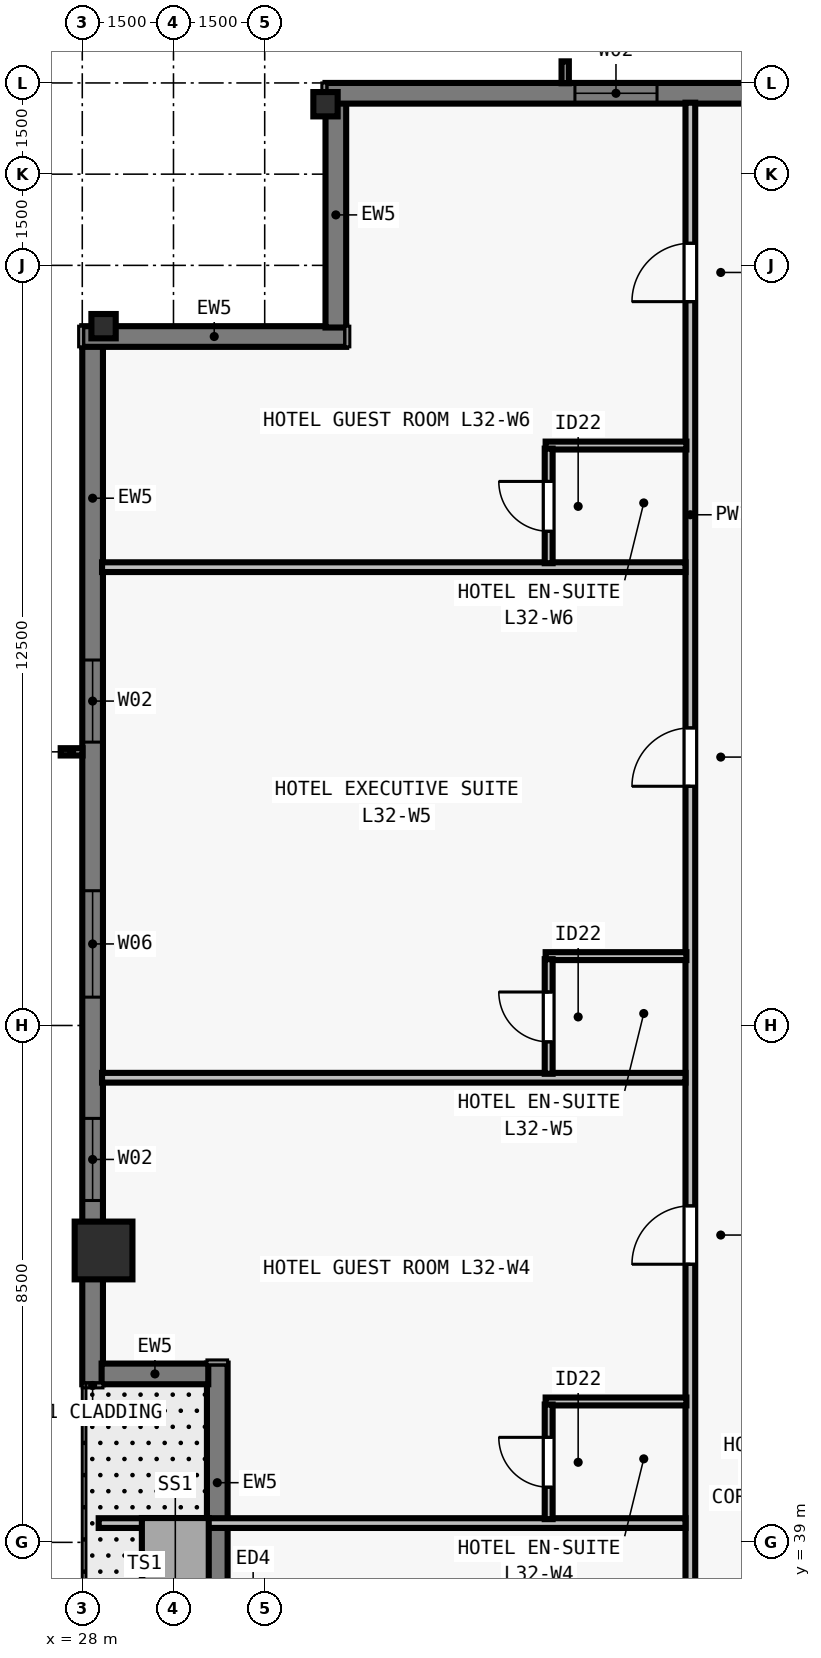
"""IFC4 building model, lengths in metres.
Left out: names, types, materials, properties, quantities, classifications, styles, units other than length and angle.
Written with IfcOpenShell. Run it as: python <this file> out.ifc"""

import sys

from ifc_helpers import new_model, si_unit, direction, frame, frame_2d, origin, origin_2d, place, context, subcontext, project, spatial, rectangle, i_section, extrude, element, fill, save


model = new_model("IFC4")
c1 = context("Model", 3, precision=1e-05, world=origin(), true_north=direction((0.0, 1.0)))
c2 = subcontext(c1, "Body", "Model", "MODEL_VIEW")
j1 = project(units=[si_unit("LENGTHUNIT", "METRE"), si_unit("PLANEANGLEUNIT", "RADIAN")], contexts=[c1])
p1 = place(None, origin())
s1 = spatial("IfcSite", under=j1, at=p1, CompositionType="ELEMENT")
p2 = place(p1, origin())
s2 = spatial("IfcBuilding", under=s1, at=p2, CompositionType="ELEMENT")
p3 = place(p2, frame((0.0, 0.0, 120.0)))
s3 = spatial("IfcBuildingStorey", under=s2, at=p3, CompositionType="ELEMENT", Elevation=120.0)
for number, where, z_axis, x_axis in (
    (1, (32.0, 62.65, 0.0), (0.0, 0.0, 1.0), (1.0, 0.0, 0.0)),
    (2, (28.35, 59.0, 0.0), (0.0, 0.0, 1.0), (0.0, 1.0, 0.0)),
):
    element("IfcColumn", number, at=place(p3, frame(where, z_axis=z_axis, x_axis=x_axis)), inside=s3, PredefinedType="COLUMN", context=c2, shape_type="SweptSolid", body=[
        extrude(i_section(OverallWidth=0.4, OverallDepth=0.4, WebThickness=0.022, FlangeThickness=0.036, at=origin_2d()), origin(), (0.0, 0.0, 1.0), 3.5),
    ])
p4 = place(p3, frame((28.35, 43.8, 0.0), z_axis=(0.0, 0.0, 1.0), x_axis=(0.0, 1.0, 0.0)))
e3 = element("IfcColumn", 3, at=p4, inside=s3, PredefinedType="COLUMN", context=c2, shape_type="SweptSolid", body=[
    extrude(rectangle(XDim=0.95, YDim=0.95, at=origin_2d()), origin(), (0.0, 0.0, 1.0), 3.5),
])
p5 = place(p3, frame((28.17, 41.6, 0.0), z_axis=(0.0, 0.0, 1.0), x_axis=(0.0, 1.0, 0.0)))
e4 = element("IfcWall", 4, at=p5, inside=s3, PredefinedType="SOLIDWALL", context=c2, shape_type="SweptSolid", body=[
    extrude(rectangle(XDim=17.082, YDim=0.34, at=frame_2d((8.541, 0.0))), origin(), (0.0, 0.0, 1.0), 3.28),
])
p6 = place(p5, frame((3.022, 0.0, 0.8)))
e5 = element("IfcOpeningElement", 5, at=p6, cuts=e4, PredefinedType="OPENING", context=c2, shape_type="SweptSolid", body=[
    extrude(rectangle(XDim=1.35, YDim=1.66, at=frame_2d((0.675, 0.83))), frame((0.0, 0.18, 0.0), z_axis=(0.0, -1.0, 0.0), x_axis=(1.0, 0.0, 0.0)), (0.0, 0.0, 1.0), 0.36),
])
p7 = place(p5, frame((6.366, 0.0, 0.8)))
e6 = element("IfcOpeningElement", 6, at=p7, cuts=e4, PredefinedType="OPENING", context=c2, shape_type="SweptSolid", body=[
    extrude(rectangle(XDim=1.75, YDim=1.66, at=frame_2d((0.875, 0.83))), frame((0.0, 0.18, 0.0), z_axis=(0.0, -1.0, 0.0), x_axis=(1.0, 0.0, 0.0)), (0.0, 0.0, 1.0), 0.36),
])
p8 = place(p5, frame((10.56, 0.0, 0.8)))
e7 = element("IfcOpeningElement", 7, at=p8, cuts=e4, PredefinedType="OPENING", context=c2, shape_type="SweptSolid", body=[
    extrude(rectangle(XDim=1.35, YDim=1.66, at=frame_2d((0.675, 0.83))), frame((0.0, 0.18, 0.0), z_axis=(0.0, -1.0, 0.0), x_axis=(1.0, 0.0, 0.0)), (0.0, 0.0, 1.0), 0.36),
])
p9 = place(p3, frame((28.0, 58.83, 0.0), z_axis=(0.0, 0.0, 1.0), x_axis=(1.0, 0.0, 0.0)))
e8 = element("IfcWall", 8, at=p9, inside=s3, PredefinedType="SOLIDWALL", context=c2, shape_type="SweptSolid", body=[
    extrude(rectangle(XDim=4.34, YDim=0.34, at=frame_2d((2.17, 0.0))), origin(), (0.0, 0.0, 1.0), 3.28),
])
p10 = place(p3, frame((32.17, 58.978, 0.0), z_axis=(0.0, 0.0, 1.0), x_axis=(0.0, 1.0, 0.0)))
e9 = element("IfcWall", 9, at=p10, inside=s3, PredefinedType="SOLIDWALL", context=c2, shape_type="SweptSolid", body=[
    extrude(rectangle(XDim=3.704, YDim=0.34, at=frame_2d((1.852, 0.0))), origin(), (0.0, 0.0, 1.0), 3.28),
])
p11 = place(p3, frame((32.0, 62.83, 0.0), z_axis=(0.0, 0.0, 1.0), x_axis=(1.0, 0.0, 0.0)))
e10 = element("IfcWall", 10, at=p11, inside=s3, PredefinedType="SOLIDWALL", context=c2, shape_type="SweptSolid", body=[
    extrude(rectangle(XDim=39.682, YDim=0.34, at=frame_2d((19.841, 0.0))), origin(), (0.0, 0.0, 1.0), 3.28),
])
p12 = place(p11, frame((4.102, 0.0, 0.8)))
e11 = element("IfcOpeningElement", 11, at=p12, cuts=e10, PredefinedType="OPENING", context=c2, shape_type="SweptSolid", body=[
    extrude(rectangle(XDim=1.35, YDim=1.66, at=frame_2d((0.675, 0.83))), frame((0.0, 0.18, 0.0), z_axis=(0.0, -1.0, 0.0), x_axis=(1.0, 0.0, 0.0)), (0.0, 0.0, 1.0), 0.36),
])
p13 = place(p11, frame((8.755, 0.0, 0.8)))
e12 = element("IfcOpeningElement", 12, at=p13, cuts=e10, PredefinedType="OPENING", context=c2, shape_type="SweptSolid", body=[
    extrude(rectangle(XDim=1.75, YDim=1.66, at=frame_2d((0.875, 0.83))), frame((0.0, 0.18, 0.0), z_axis=(0.0, -1.0, 0.0), x_axis=(1.0, 0.0, 0.0)), (0.0, 0.0, 1.0), 0.36),
])
p14 = place(p11, frame((12.059, 0.0, 0.8)))
e13 = element("IfcOpeningElement", 13, at=p14, cuts=e10, PredefinedType="OPENING", context=c2, shape_type="SweptSolid", body=[
    extrude(rectangle(XDim=1.35, YDim=1.66, at=frame_2d((0.675, 0.83))), frame((0.0, 0.18, 0.0), z_axis=(0.0, -1.0, 0.0), x_axis=(1.0, 0.0, 0.0)), (0.0, 0.0, 1.0), 0.36),
])
p15 = place(p11, frame((16.262, 0.0, 0.8)))
e14 = element("IfcOpeningElement", 14, at=p15, cuts=e10, PredefinedType="OPENING", context=c2, shape_type="SweptSolid", body=[
    extrude(rectangle(XDim=1.75, YDim=1.66, at=frame_2d((0.875, 0.83))), frame((0.0, 0.18, 0.0), z_axis=(0.0, -1.0, 0.0), x_axis=(1.0, 0.0, 0.0)), (0.0, 0.0, 1.0), 0.36),
])
p16 = place(p11, frame((18.316, 0.0, 0.8)))
e15 = element("IfcOpeningElement", 15, at=p16, cuts=e10, PredefinedType="OPENING", context=c2, shape_type="SweptSolid", body=[
    extrude(rectangle(XDim=1.35, YDim=1.66, at=frame_2d((0.675, 0.83))), frame((0.0, 0.18, 0.0), z_axis=(0.0, -1.0, 0.0), x_axis=(1.0, 0.0, 0.0)), (0.0, 0.0, 1.0), 0.36),
])
p17 = place(p11, frame((22.07, 0.0, 0.8)))
e16 = element("IfcOpeningElement", 16, at=p17, cuts=e10, PredefinedType="OPENING", context=c2, shape_type="SweptSolid", body=[
    extrude(rectangle(XDim=1.75, YDim=1.66, at=frame_2d((0.875, 0.83))), frame((0.0, 0.18, 0.0), z_axis=(0.0, -1.0, 0.0), x_axis=(1.0, 0.0, 0.0)), (0.0, 0.0, 1.0), 0.36),
])
p18 = place(p11, frame((26.273, 0.0, 0.8)))
e17 = element("IfcOpeningElement", 17, at=p18, cuts=e10, PredefinedType="OPENING", context=c2, shape_type="SweptSolid", body=[
    extrude(rectangle(XDim=1.35, YDim=1.66, at=frame_2d((0.675, 0.83))), frame((0.0, 0.18, 0.0), z_axis=(0.0, -1.0, 0.0), x_axis=(1.0, 0.0, 0.0)), (0.0, 0.0, 1.0), 0.36),
])
p19 = place(p11, frame((33.38, 0.0, 0.8)))
e18 = element("IfcOpeningElement", 18, at=p19, cuts=e10, PredefinedType="OPENING", context=c2, shape_type="SweptSolid", body=[
    extrude(rectangle(XDim=1.35, YDim=1.66, at=frame_2d((0.675, 0.83))), frame((0.0, 0.18, 0.0), z_axis=(0.0, -1.0, 0.0), x_axis=(1.0, 0.0, 0.0)), (0.0, 0.0, 1.0), 0.36),
])
p20 = place(p3, frame((30.22, 34.778, 0.0), z_axis=(0.0, 0.0, 1.0), x_axis=(0.0, 1.0, 0.0)))
e19 = element("IfcWall", 19, at=p20, inside=s3, PredefinedType="SOLIDWALL", context=c2, shape_type="SweptSolid", body=[
    extrude(rectangle(XDim=7.162, YDim=0.34, at=frame_2d((3.581, 0.0))), origin(), (0.0, 0.0, 1.0), 3.28),
])
p21 = place(p20, frame((2.094, 0.0, 0.0)))
e20 = element("IfcOpeningElement", 20, at=p21, cuts=e19, PredefinedType="OPENING", context=c2, shape_type="SweptSolid", body=[
    extrude(rectangle(XDim=1.0, YDim=2.15, at=frame_2d((0.5, 1.075))), frame((0.0, 0.18, 0.0), z_axis=(0.0, -1.0, 0.0), x_axis=(1.0, 0.0, 0.0)), (0.0, 0.0, 1.0), 0.36),
])
p22 = place(p3, frame((30.072, 41.77, 0.0), z_axis=(0.0, 0.0, 1.0), x_axis=(-1.0, 0.0, 0.0)))
e21 = element("IfcWall", 21, at=p22, inside=s3, PredefinedType="SOLIDWALL", context=c2, shape_type="SweptSolid", body=[
    extrude(rectangle(XDim=1.754, YDim=0.34, at=frame_2d((0.877, 0.0))), origin(), (0.0, 0.0, 1.0), 3.28),
])
p23 = place(p3, frame((38.0, 15.325, 0.0), z_axis=(0.0, 0.0, 1.0), x_axis=(0.0, 1.0, 0.0)))
e22 = element("IfcWall", 22, at=p23, inside=s3, PredefinedType="PARTITIONING", context=c2, shape_type="SweptSolid", body=[
    extrude(rectangle(XDim=47.35, YDim=0.16, at=frame_2d((23.675, 0.0))), origin(), (0.0, 0.0, 1.0), 2.555),
])
p24 = place(p23, frame((5.003, 0.0, 0.0)))
e23 = element("IfcOpeningElement", 23, at=p24, cuts=e22, PredefinedType="OPENING", context=c2, shape_type="SweptSolid", body=[
    extrude(rectangle(XDim=0.96, YDim=2.15, at=frame_2d((0.48, 1.075))), frame((0.0, 0.09, 0.0), z_axis=(0.0, -1.0, 0.0), x_axis=(1.0, 0.0, 0.0)), (0.0, 0.0, 1.0), 0.18),
])
p25 = place(p23, frame((12.529, 0.0, 0.0)))
e24 = element("IfcOpeningElement", 24, at=p25, cuts=e22, PredefinedType="OPENING", context=c2, shape_type="SweptSolid", body=[
    extrude(rectangle(XDim=0.96, YDim=2.15, at=frame_2d((0.48, 1.075))), frame((0.0, 0.09, 0.0), z_axis=(0.0, -1.0, 0.0), x_axis=(1.0, 0.0, 0.0)), (0.0, 0.0, 1.0), 0.18),
])
p26 = place(p23, frame((20.389, 0.0, 0.0)))
e25 = element("IfcOpeningElement", 25, at=p26, cuts=e22, PredefinedType="OPENING", context=c2, shape_type="SweptSolid", body=[
    extrude(rectangle(XDim=0.96, YDim=2.15, at=frame_2d((0.48, 1.075))), frame((0.0, 0.09, 0.0), z_axis=(0.0, -1.0, 0.0), x_axis=(1.0, 0.0, 0.0)), (0.0, 0.0, 1.0), 0.18),
])
p27 = place(p23, frame((28.249, 0.0, 0.0)))
e26 = element("IfcOpeningElement", 26, at=p27, cuts=e22, PredefinedType="OPENING", context=c2, shape_type="SweptSolid", body=[
    extrude(rectangle(XDim=0.96, YDim=2.15, at=frame_2d((0.48, 1.075))), frame((0.0, 0.09, 0.0), z_axis=(0.0, -1.0, 0.0), x_axis=(1.0, 0.0, 0.0)), (0.0, 0.0, 1.0), 0.18),
])
p28 = place(p23, frame((36.109, 0.0, 0.0)))
e27 = element("IfcOpeningElement", 27, at=p28, cuts=e22, PredefinedType="OPENING", context=c2, shape_type="SweptSolid", body=[
    extrude(rectangle(XDim=0.96, YDim=2.15, at=frame_2d((0.48, 1.075))), frame((0.0, 0.09, 0.0), z_axis=(0.0, -1.0, 0.0), x_axis=(1.0, 0.0, 0.0)), (0.0, 0.0, 1.0), 0.18),
])
p29 = place(p23, frame((44.079, 0.0, 0.0)))
e28 = element("IfcOpeningElement", 28, at=p29, cuts=e22, PredefinedType="OPENING", context=c2, shape_type="SweptSolid", body=[
    extrude(rectangle(XDim=0.96, YDim=2.15, at=frame_2d((0.48, 1.075))), frame((0.0, 0.09, 0.0), z_axis=(0.0, -1.0, 0.0), x_axis=(1.0, 0.0, 0.0)), (0.0, 0.0, 1.0), 0.18),
])
p30 = place(p3, frame((28.27, 39.317, 0.0), z_axis=(0.0, 0.0, 1.0), x_axis=(1.0, 0.0, 0.0)))
e29 = element("IfcWall", 29, at=p30, inside=s3, PredefinedType="PARTITIONING", context=c2, shape_type="SweptSolid", body=[
    extrude(rectangle(XDim=9.65, YDim=0.16, at=frame_2d((4.825, 0.0))), origin(), (0.0, 0.0, 1.0), 2.896),
])
p31 = place(p3, frame((35.62, 41.317, 0.0), z_axis=(0.0, 0.0, 1.0), x_axis=(1.0, 0.0, 0.0)))
e30 = element("IfcWall", 30, at=p31, inside=s3, PredefinedType="PLUMBINGWALL", context=c2, shape_type="SweptSolid", body=[
    extrude(rectangle(XDim=2.315, YDim=0.13, at=frame_2d((1.157, 0.0))), origin(), (0.0, 0.0, 1.0), 2.896),
])
p32 = place(p3, frame((35.67, 39.382, 0.0), z_axis=(0.0, 0.0, 1.0), x_axis=(0.0, 1.0, 0.0)))
e31 = element("IfcWall", 31, at=p32, inside=s3, PredefinedType="PLUMBINGWALL", context=c2, shape_type="SweptSolid", body=[
    extrude(rectangle(XDim=1.885, YDim=0.13, at=frame_2d((0.942, 0.0))), origin(), (0.0, 0.0, 1.0), 3.28),
])
p33 = place(p32, frame((0.525, 0.0, 0.0)))
e32 = element("IfcOpeningElement", 32, at=p33, cuts=e31, PredefinedType="OPENING", context=c2, shape_type="SweptSolid", body=[
    extrude(rectangle(XDim=0.82, YDim=2.1, at=frame_2d((0.41, 1.05))), frame((0.0, 0.075, 0.0), z_axis=(0.0, -1.0, 0.0), x_axis=(1.0, 0.0, 0.0)), (0.0, 0.0, 1.0), 0.15),
])
p34 = place(p3, frame((28.325, 46.641, 0.0), z_axis=(0.0, 0.0, 1.0), x_axis=(1.0, 0.0, 0.0)))
e33 = element("IfcWall", 33, at=p34, inside=s3, PredefinedType="PARTITIONING", context=c2, shape_type="SweptSolid", body=[
    extrude(rectangle(XDim=9.595, YDim=0.16, at=frame_2d((4.797, 0.0))), origin(), (0.0, 0.0, 1.0), 3.28),
])
p35 = place(p3, frame((35.62, 48.641, 0.0), z_axis=(0.0, 0.0, 1.0), x_axis=(1.0, 0.0, 0.0)))
e34 = element("IfcWall", 34, at=p35, inside=s3, PredefinedType="PLUMBINGWALL", context=c2, shape_type="SweptSolid", body=[
    extrude(rectangle(XDim=2.315, YDim=0.13, at=frame_2d((1.157, 0.0))), origin(), (0.0, 0.0, 1.0), 3.28),
])
p36 = place(p3, frame((35.67, 46.706, 0.0), z_axis=(0.0, 0.0, 1.0), x_axis=(0.0, 1.0, 0.0)))
e35 = element("IfcWall", 35, at=p36, inside=s3, PredefinedType="PLUMBINGWALL", context=c2, shape_type="SweptSolid", body=[
    extrude(rectangle(XDim=1.885, YDim=0.13, at=frame_2d((0.942, 0.0))), origin(), (0.0, 0.0, 1.0), 3.28),
])
p37 = place(p36, frame((0.525, 0.0, 0.0)))
e36 = element("IfcOpeningElement", 36, at=p37, cuts=e35, PredefinedType="OPENING", context=c2, shape_type="SweptSolid", body=[
    extrude(rectangle(XDim=0.82, YDim=2.1, at=frame_2d((0.41, 1.05))), frame((0.0, 0.075, 0.0), z_axis=(0.0, -1.0, 0.0), x_axis=(1.0, 0.0, 0.0)), (0.0, 0.0, 1.0), 0.15),
])
p38 = place(p3, frame((28.325, 55.037, 0.0), z_axis=(0.0, 0.0, 1.0), x_axis=(1.0, 0.0, 0.0)))
e37 = element("IfcWall", 37, at=p38, inside=s3, PredefinedType="PARTITIONING", context=c2, shape_type="SweptSolid", body=[
    extrude(rectangle(XDim=9.595, YDim=0.16, at=frame_2d((4.797, 0.0))), origin(), (0.0, 0.0, 1.0), 2.896),
])
p39 = place(p3, frame((35.62, 57.037, 0.0), z_axis=(0.0, 0.0, 1.0), x_axis=(1.0, 0.0, 0.0)))
e38 = element("IfcWall", 38, at=p39, inside=s3, PredefinedType="PLUMBINGWALL", context=c2, shape_type="SweptSolid", body=[
    extrude(rectangle(XDim=2.315, YDim=0.13, at=frame_2d((1.157, 0.0))), origin(), (0.0, 0.0, 1.0), 3.28),
])
p40 = place(p3, frame((35.67, 55.102, 0.0), z_axis=(0.0, 0.0, 1.0), x_axis=(0.0, 1.0, 0.0)))
e39 = element("IfcWall", 39, at=p40, inside=s3, PredefinedType="PLUMBINGWALL", context=c2, shape_type="SweptSolid", body=[
    extrude(rectangle(XDim=1.885, YDim=0.13, at=frame_2d((0.942, 0.0))), origin(), (0.0, 0.0, 1.0), 3.28),
])
p41 = place(p40, frame((0.525, 0.0, 0.0)))
e40 = element("IfcOpeningElement", 40, at=p41, cuts=e39, PredefinedType="OPENING", context=c2, shape_type="SweptSolid", body=[
    extrude(rectangle(XDim=0.82, YDim=2.1, at=frame_2d((0.41, 1.05))), frame((0.0, 0.075, 0.0), z_axis=(0.0, -1.0, 0.0), x_axis=(1.0, 0.0, 0.0)), (0.0, 0.0, 1.0), 0.15),
])
p42 = place(p6, origin())
e41 = element("IfcWindow", 41, at=p42, inside=s3, PartitioningType="SINGLE_PANEL", PredefinedType="WINDOW", context=c2, shape_type="SweptSolid", body=[
    extrude(rectangle(XDim=1.35, YDim=1.66, at=frame_2d((0.675, 0.83))), frame((0.0, -0.05, 0.0), z_axis=(0.0, -1.0, 0.0), x_axis=(1.0, 0.0, 0.0)), (0.0, 0.0, 1.0), 0.06),
])
fill(e5, e41)
p43 = place(p7, origin())
e42 = element("IfcWindow", 42, at=p43, inside=s3, PartitioningType="SINGLE_PANEL", PredefinedType="WINDOW", context=c2, shape_type="SweptSolid", body=[
    extrude(rectangle(XDim=1.75, YDim=1.66, at=frame_2d((0.875, 0.83))), frame((0.0, -0.05, 0.0), z_axis=(0.0, -1.0, 0.0), x_axis=(1.0, 0.0, 0.0)), (0.0, 0.0, 1.0), 0.06),
])
fill(e6, e42)
p44 = place(p8, origin())
e43 = element("IfcWindow", 43, at=p44, inside=s3, PartitioningType="SINGLE_PANEL", PredefinedType="WINDOW", context=c2, shape_type="SweptSolid", body=[
    extrude(rectangle(XDim=1.35, YDim=1.66, at=frame_2d((0.675, 0.83))), frame((0.0, -0.05, 0.0), z_axis=(0.0, -1.0, 0.0), x_axis=(1.0, 0.0, 0.0)), (0.0, 0.0, 1.0), 0.06),
])
fill(e7, e43)
p45 = place(p12, origin())
e44 = element("IfcWindow", 44, at=p45, inside=s3, PartitioningType="SINGLE_PANEL", PredefinedType="WINDOW", context=c2, shape_type="SweptSolid", body=[
    extrude(rectangle(XDim=1.35, YDim=1.66, at=frame_2d((0.675, 0.83))), frame((0.0, -0.05, 0.0), z_axis=(0.0, -1.0, 0.0), x_axis=(1.0, 0.0, 0.0)), (0.0, 0.0, 1.0), 0.06),
])
fill(e11, e44)
p46 = place(p33, origin())
e45 = element("IfcDoor", 45, at=p46, inside=s3, OperationType="SINGLE_SWING_RIGHT", PredefinedType="DOOR", context=c2, shape_type="SweptSolid", body=[
    extrude(rectangle(XDim=0.82, YDim=2.1, at=frame_2d((0.41, 1.05))), frame((0.0, 0.025, 0.0), z_axis=(0.0, -1.0, 0.0), x_axis=(1.0, 0.0, 0.0)), (0.0, 0.0, 1.0), 0.05),
])
fill(e32, e45)
p47 = place(p27, origin())
e46 = element("IfcDoor", 46, at=p47, inside=s3, OperationType="SINGLE_SWING_LEFT", PredefinedType="DOOR", context=c2, shape_type="SweptSolid", body=[
    extrude(rectangle(XDim=0.96, YDim=2.15, at=frame_2d((0.48, 1.075))), frame((0.0, 0.025, 0.0), z_axis=(0.0, -1.0, 0.0), x_axis=(1.0, 0.0, 0.0)), (0.0, 0.0, 1.0), 0.05),
])
fill(e26, e46)
p48 = place(p37, origin())
e47 = element("IfcDoor", 47, at=p48, inside=s3, OperationType="SINGLE_SWING_RIGHT", PredefinedType="DOOR", context=c2, shape_type="SweptSolid", body=[
    extrude(rectangle(XDim=0.82, YDim=2.1, at=frame_2d((0.41, 1.05))), frame((0.0, 0.025, 0.0), z_axis=(0.0, -1.0, 0.0), x_axis=(1.0, 0.0, 0.0)), (0.0, 0.0, 1.0), 0.05),
])
fill(e36, e47)
p49 = place(p28, origin())
e48 = element("IfcDoor", 48, at=p49, inside=s3, OperationType="SINGLE_SWING_LEFT", PredefinedType="DOOR", context=c2, shape_type="SweptSolid", body=[
    extrude(rectangle(XDim=0.96, YDim=2.15, at=frame_2d((0.48, 1.075))), frame((0.0, 0.025, 0.0), z_axis=(0.0, -1.0, 0.0), x_axis=(1.0, 0.0, 0.0)), (0.0, 0.0, 1.0), 0.05),
])
fill(e27, e48)
p50 = place(p41, origin())
e49 = element("IfcDoor", 49, at=p50, inside=s3, OperationType="SINGLE_SWING_RIGHT", PredefinedType="DOOR", context=c2, shape_type="SweptSolid", body=[
    extrude(rectangle(XDim=0.82, YDim=2.1, at=frame_2d((0.41, 1.05))), frame((0.0, 0.025, 0.0), z_axis=(0.0, -1.0, 0.0), x_axis=(1.0, 0.0, 0.0)), (0.0, 0.0, 1.0), 0.05),
])
fill(e40, e49)
p51 = place(p29, origin())
e50 = element("IfcDoor", 50, at=p51, inside=s3, OperationType="SINGLE_SWING_LEFT", PredefinedType="DOOR", context=c2, shape_type="SweptSolid", body=[
    extrude(rectangle(XDim=0.96, YDim=2.15, at=frame_2d((0.48, 1.075))), frame((0.0, 0.025, 0.0), z_axis=(0.0, -1.0, 0.0), x_axis=(1.0, 0.0, 0.0)), (0.0, 0.0, 1.0), 0.05),
])
fill(e28, e50)
save(model, sys.argv[1])
